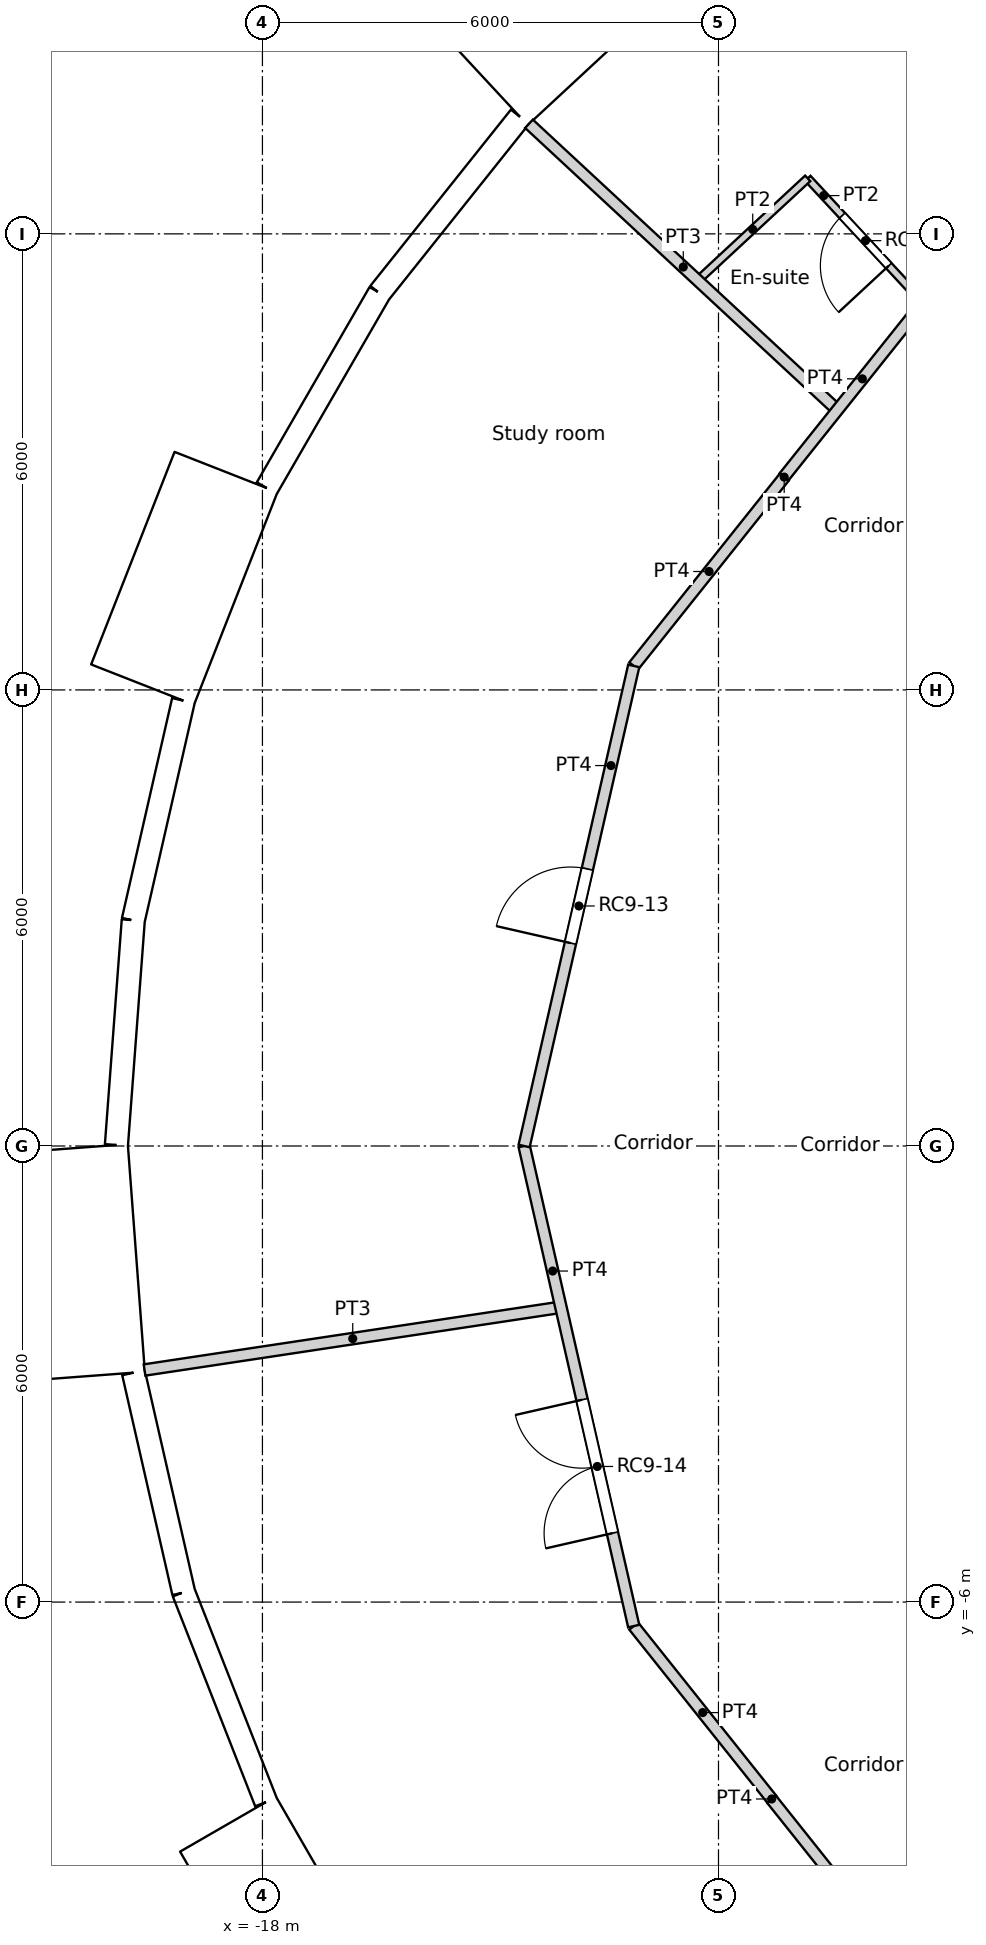
"""IFC4 building model, lengths in metres.
Left out: names, types, materials, properties, quantities, classifications, styles, units other than length and angle.
Written with IfcOpenShell. Run it as: python <this file> out.ifc"""

import sys

from ifc_helpers import new_model, si_unit, direction, frame, frame_2d, origin, origin_2d, place, context, subcontext, project, spatial, rectangle, circle, extrude, element, fill, save


model = new_model("IFC4")
c1 = context("Model", 3, precision=1e-05, world=origin(), true_north=direction((0.0, 1.0)))
c2 = subcontext(c1, "Body", "Model", "MODEL_VIEW")
j1 = project(units=[si_unit("LENGTHUNIT", "METRE"), si_unit("PLANEANGLEUNIT", "RADIAN")], contexts=[c1])
p1 = place(None, origin())
s1 = spatial("IfcSite", under=j1, at=p1, CompositionType="ELEMENT")
p2 = place(p1, origin())
s2 = spatial("IfcBuilding", under=s1, at=p2, CompositionType="ELEMENT")
p3 = place(p2, frame((0.0, 0.0, 316.2)))
s3 = spatial("IfcBuildingStorey", under=s2, at=p3, CompositionType="ELEMENT", Elevation=316.2)
for number, where, z_axis, x_axis in (
    (1, (-13.798, 12.802, 0.0), (0.0, 0.0, 1.0), (1.0, 0.0, 0.0)),
    (2, (-16.958, 8.167, 0.0), (0.0, 0.0, 1.0), (1.0, 0.0, 0.0)),
    (3, (-18.612, 2.805, 0.0), (0.0, 0.0, 1.0), (1.0, 0.0, 0.0)),
    (4, (-18.612, -2.805, 0.0), (0.0, 0.0, 1.0), (1.0, 0.0, 0.0)),
    (5, (-16.958, -8.167, 0.0), (0.0, 0.0, 1.0), (1.0, 0.0, 0.0)),
):
    element("IfcColumn", number, at=place(p3, frame(where, z_axis=z_axis, x_axis=x_axis)), inside=s3, PredefinedType="COLUMN", context=c2, shape_type="SweptSolid", body=[
        extrude(circle(Radius=0.45, at=origin_2d()), origin(), (0.0, 0.0, 1.0), 3.6),
    ])
p4 = place(p3, frame((-12.804, 16.005, -0.35), z_axis=(0.0, 0.0, 1.0), x_axis=(-0.733022439167, -0.680204457261, 0.0)))
e6 = element("IfcWall", 6, at=p4, inside=s3, PredefinedType="ELEMENTEDWALL", context=c2, shape_type="SweptSolid", body=[
    extrude(rectangle(XDim=3.0, YDim=1.45, at=frame_2d((1.5, 0.0))), origin(), (0.0, 0.0, 1.0), 3.6),
])
p5 = place(p4, frame((1.5, 0.0, 1.9)))
e7 = element("IfcOpeningElement", 7, at=p5, cuts=e6, PredefinedType="OPENING", context=c2, shape_type="SweptSolid", body=[
    extrude(circle(Radius=0.9, at=origin_2d()), frame((0.0, 0.735, 0.0), z_axis=(0.0, -1.0, 0.0), x_axis=(1.0, 0.0, 0.0)), (0.0, 0.0, 1.0), 1.47),
])
p6 = place(p3, frame((-14.613, 13.538, 0.0), z_axis=(0.0, 0.0, 1.0), x_axis=(-0.623498236992, -0.781824755599, 0.0)))
e8 = element("IfcWall", 8, at=p6, inside=s3, PredefinedType="SOLIDWALL", context=c2, shape_type="SweptSolid", body=[
    extrude(rectangle(XDim=2.962, YDim=0.3, at=frame_2d((1.481, 0.0))), origin(), (0.0, 0.0, 1.0), 3.25),
])
p7 = place(p6, frame((1.481, 0.0, 1.55)))
e9 = element("IfcOpeningElement", 9, at=p7, cuts=e8, PredefinedType="OPENING", context=c2, shape_type="SweptSolid", body=[
    extrude(circle(Radius=0.9, at=origin_2d()), frame((0.0, 0.16, 0.0), z_axis=(0.0, -1.0, 0.0), x_axis=(1.0, 0.0, 0.0)), (0.0, 0.0, 1.0), 0.32),
])
p8 = place(p3, frame((-16.46, 11.222, 0.0), z_axis=(0.0, 0.0, 1.0), x_axis=(-0.499950756475, -0.86605383268, 0.0)))
e10 = element("IfcWall", 10, at=p8, inside=s3, PredefinedType="SOLIDWALL", context=c2, shape_type="SweptSolid", body=[
    extrude(rectangle(XDim=2.962, YDim=0.3, at=frame_2d((1.481, 0.0))), origin(), (0.0, 0.0, 1.0), 3.25),
])
p9 = place(p8, frame((1.481, 0.0, 1.55)))
e11 = element("IfcOpeningElement", 11, at=p9, cuts=e10, PredefinedType="OPENING", context=c2, shape_type="SweptSolid", body=[
    extrude(circle(Radius=0.9, at=origin_2d()), frame((0.0, 0.16, 0.0), z_axis=(0.0, -1.0, 0.0), x_axis=(1.0, 0.0, 0.0)), (0.0, 0.0, 1.0), 0.32),
])
p10 = place(p3, frame((-18.48, 8.864, -0.35), z_axis=(0.0, 0.0, 1.0), x_axis=(-0.36537792632, -0.93085926485, 0.0)))
e12 = element("IfcWall", 12, at=p10, inside=s3, PredefinedType="ELEMENTEDWALL", context=c2, shape_type="SweptSolid", body=[
    extrude(rectangle(XDim=3.0, YDim=1.45, at=frame_2d((1.5, 0.0))), origin(), (0.0, 0.0, 1.0), 3.6),
])
p11 = place(p10, frame((1.5, 0.0, 1.9)))
e13 = element("IfcOpeningElement", 13, at=p11, cuts=e12, PredefinedType="OPENING", context=c2, shape_type="SweptSolid", body=[
    extrude(circle(Radius=0.9, at=origin_2d()), frame((0.0, 0.735, 0.0), z_axis=(0.0, -1.0, 0.0), x_axis=(1.0, 0.0, 0.0)), (0.0, 0.0, 1.0), 1.47),
])
p12 = place(p3, frame((-19.04, 5.857, 0.0), z_axis=(0.0, 0.0, 1.0), x_axis=(-0.222529389789, -0.974925982155, 0.0)))
e14 = element("IfcWall", 14, at=p12, inside=s3, PredefinedType="SOLIDWALL", context=c2, shape_type="SweptSolid", body=[
    extrude(rectangle(XDim=2.962, YDim=0.3, at=frame_2d((1.481, 0.0))), origin(), (0.0, 0.0, 1.0), 3.25),
])
p13 = place(p12, frame((1.481, 0.0, 1.55)))
e15 = element("IfcOpeningElement", 15, at=p13, cuts=e14, PredefinedType="OPENING", context=c2, shape_type="SweptSolid", body=[
    extrude(circle(Radius=0.9, at=origin_2d()), frame((0.0, 0.16, 0.0), z_axis=(0.0, -1.0, 0.0), x_axis=(1.0, 0.0, 0.0)), (0.0, 0.0, 1.0), 0.32),
])
p14 = place(p3, frame((-19.699, 2.969, 0.0), z_axis=(0.0, 0.0, 1.0), x_axis=(-0.07474897196, -0.997202382263, 0.0)))
e16 = element("IfcWall", 16, at=p14, inside=s3, PredefinedType="SOLIDWALL", context=c2, shape_type="SweptSolid", body=[
    extrude(rectangle(XDim=2.962, YDim=0.3, at=frame_2d((1.481, 0.0))), origin(), (0.0, 0.0, 1.0), 3.25),
])
p15 = place(p14, frame((1.481, 0.0, 1.55)))
e17 = element("IfcOpeningElement", 17, at=p15, cuts=e16, PredefinedType="OPENING", context=c2, shape_type="SweptSolid", body=[
    extrude(circle(Radius=0.9, at=origin_2d()), frame((0.0, 0.16, 0.0), z_axis=(0.0, -1.0, 0.0), x_axis=(1.0, 0.0, 0.0)), (0.0, 0.0, 1.0), 0.32),
])
p16 = place(p3, frame((-20.496, -0.032, -0.35), z_axis=(0.0, 0.0, 1.0), x_axis=(0.074785902127, -0.997199613339, 0.0)))
e18 = element("IfcWall", 18, at=p16, inside=s3, PredefinedType="ELEMENTEDWALL", context=c2, shape_type="SweptSolid", body=[
    extrude(rectangle(XDim=3.0, YDim=1.45, at=frame_2d((1.5, 0.0))), origin(), (0.0, 0.0, 1.0), 3.6),
])
p17 = place(p16, frame((1.5, 0.0, 1.9)))
e19 = element("IfcOpeningElement", 19, at=p17, cuts=e18, PredefinedType="OPENING", context=c2, shape_type="SweptSolid", body=[
    extrude(circle(Radius=0.9, at=origin_2d()), frame((0.0, 0.735, 0.0), z_axis=(0.0, -1.0, 0.0), x_axis=(1.0, 0.0, 0.0)), (0.0, 0.0, 1.0), 1.47),
])
p18 = place(p3, frame((-19.696, -2.984, 0.0), z_axis=(0.0, 0.0, 1.0), x_axis=(0.222529389789, -0.974925982155, 0.0)))
e20 = element("IfcWall", 20, at=p18, inside=s3, PredefinedType="SOLIDWALL", context=c2, shape_type="SweptSolid", body=[
    extrude(rectangle(XDim=2.962, YDim=0.3, at=frame_2d((1.481, 0.0))), origin(), (0.0, 0.0, 1.0), 3.25),
])
p19 = place(p18, frame((1.481, 0.0, 1.55)))
e21 = element("IfcOpeningElement", 21, at=p19, cuts=e20, PredefinedType="OPENING", context=c2, shape_type="SweptSolid", body=[
    extrude(circle(Radius=0.9, at=origin_2d()), frame((0.0, 0.16, 0.0), z_axis=(0.0, -1.0, 0.0), x_axis=(1.0, 0.0, 0.0)), (0.0, 0.0, 1.0), 0.32),
])
p20 = place(p3, frame((-19.037, -5.872, 0.0), z_axis=(0.0, 0.0, 1.0), x_axis=(0.36530043032, -0.930889679612, 0.0)))
e22 = element("IfcWall", 22, at=p20, inside=s3, PredefinedType="SOLIDWALL", context=c2, shape_type="SweptSolid", body=[
    extrude(rectangle(XDim=2.962, YDim=0.3, at=frame_2d((1.481, 0.0))), origin(), (0.0, 0.0, 1.0), 3.25),
])
p21 = place(p20, frame((1.481, 0.0, 1.55)))
e23 = element("IfcOpeningElement", 23, at=p21, cuts=e22, PredefinedType="OPENING", context=c2, shape_type="SweptSolid", body=[
    extrude(circle(Radius=0.9, at=origin_2d()), frame((0.0, 0.16, 0.0), z_axis=(0.0, -1.0, 0.0), x_axis=(1.0, 0.0, 0.0)), (0.0, 0.0, 1.0), 0.32),
])
p22 = place(p3, frame((-18.452, -8.921, -0.35), z_axis=(0.0, 0.0, 1.0), x_axis=(0.499990139034, -0.866031096941, 0.0)))
e24 = element("IfcWall", 24, at=p22, inside=s3, PredefinedType="ELEMENTEDWALL", context=c2, shape_type="SweptSolid", body=[
    extrude(rectangle(XDim=3.0, YDim=1.45, at=frame_2d((1.5, 0.0))), origin(), (0.0, 0.0, 1.0), 3.6),
])
p23 = place(p22, frame((1.5, 0.0, 1.9)))
e25 = element("IfcOpeningElement", 25, at=p23, cuts=e24, PredefinedType="OPENING", context=c2, shape_type="SweptSolid", body=[
    extrude(circle(Radius=0.9, at=origin_2d()), frame((0.0, 0.735, 0.0), z_axis=(0.0, -1.0, 0.0), x_axis=(1.0, 0.0, 0.0)), (0.0, 0.0, 1.0), 1.47),
])
p24 = place(p3, frame((-11.137, 8.803, 0.0), z_axis=(0.0, 0.0, 1.0), x_axis=(0.624018330412, 0.781409702595, 0.0)))
e26 = element("IfcWall", 26, at=p24, inside=s3, PredefinedType="PARTITIONING", context=c2, shape_type="SweptSolid", body=[
    extrude(rectangle(XDim=3.301, YDim=0.15, at=frame_2d((1.65, 0.0))), origin(), (0.0, 0.0, 1.0), 3.25),
])
p25 = place(p3, frame((-11.134, 8.8, 0.0), z_axis=(0.0, 0.0, 1.0), x_axis=(-1.0, 0.0, 0.0)))
e27 = element("IfcWall", 27, at=p25, inside=s3, PredefinedType="PARTITIONING", context=c2, shape_type="SweptSolid", body=[
    extrude(rectangle(XDim=0.003, YDim=0.15, at=frame_2d((0.001, 0.0))), origin(), (0.0, 0.0, 1.0), 3.25),
])
p26 = place(p3, frame((-11.3, -8.596, 0.0), z_axis=(0.0, 0.0, 1.0), x_axis=(0.623165080354, -0.782090328944, 0.0)))
e28 = element("IfcWall", 28, at=p26, inside=s3, PredefinedType="PARTITIONING", context=c2, shape_type="SweptSolid", body=[
    extrude(rectangle(XDim=3.564, YDim=0.15, at=frame_2d((1.782, 0.0))), origin(), (0.0, 0.0, 1.0), 3.25),
])
p27 = place(p3, frame((-11.3, -8.596, 0.0), z_axis=(0.0, 0.0, 1.0), x_axis=(0.0, 1.0, 0.0)))
e29 = element("IfcWall", 29, at=p27, inside=s3, PredefinedType="PARTITIONING", context=c2, shape_type="SweptSolid", body=[
    extrude(rectangle(XDim=0.011, YDim=0.15, at=frame_2d((0.006, 0.0))), origin(), (0.0, 0.0, 1.0), 3.25),
])
p28 = place(p3, frame((-14.557, 0.0, 0.0), z_axis=(0.0, 0.0, 1.0), x_axis=(0.222489165471, -0.974935162587, 0.0)))
e30 = element("IfcWall", 30, at=p28, inside=s3, PredefinedType="PARTITIONING", context=c2, shape_type="SweptSolid", body=[
    extrude(rectangle(XDim=6.479, YDim=0.15, at=frame_2d((3.239, 0.0))), origin(), (0.0, 0.0, 1.0), 3.25),
])
p29 = place(p28, frame((3.425, 0.0, 0.0)))
e31 = element("IfcOpeningElement", 31, at=p29, cuts=e30, PredefinedType="OPENING", context=c2, shape_type="SweptSolid", body=[
    extrude(rectangle(XDim=1.8, YDim=2.1, at=frame_2d((0.9, 1.05))), frame((0.0, 0.075, 0.0), z_axis=(0.0, -1.0, 0.0), x_axis=(1.0, 0.0, 0.0)), (0.0, 0.0, 1.0), 0.15),
])
p30 = place(p3, frame((-14.557, 0.0, 0.0), z_axis=(0.0, 0.0, 1.0), x_axis=(0.222568978642, 0.97491694505, 0.0)))
e32 = element("IfcWall", 32, at=p30, inside=s3, PredefinedType="PARTITIONING", context=c2, shape_type="SweptSolid", body=[
    extrude(rectangle(XDim=6.479, YDim=0.15, at=frame_2d((3.239, 0.0))), origin(), (0.0, 0.0, 1.0), 3.25),
])
p31 = place(p30, frame((2.739, 0.0, 0.0)))
e33 = element("IfcOpeningElement", 33, at=p31, cuts=e32, PredefinedType="OPENING", context=c2, shape_type="SweptSolid", body=[
    extrude(rectangle(XDim=1.0, YDim=2.04, at=frame_2d((0.5, 1.02))), frame((0.0, 0.075, 0.0), z_axis=(0.0, -1.0, 0.0), x_axis=(1.0, 0.0, 0.0)), (0.0, 0.0, 1.0), 0.15),
])
p32 = place(p3, frame((-13.115, 6.316, 0.0), z_axis=(0.0, 0.0, 1.0), x_axis=(0.623476099415, 0.781842409606, 0.0)))
e34 = element("IfcWall", 34, at=p32, inside=s3, PredefinedType="PARTITIONING", context=c2, shape_type="SweptSolid", body=[
    extrude(rectangle(XDim=3.177, YDim=0.15, at=frame_2d((1.589, 0.0))), origin(), (0.0, 0.0, 1.0), 3.25),
])
p33 = place(p3, frame((-13.115, -6.316, 0.0), z_axis=(0.0, 0.0, 1.0), x_axis=(0.623446514299, -0.781866001185, 0.0)))
e35 = element("IfcWall", 35, at=p33, inside=s3, PredefinedType="PARTITIONING", context=c2, shape_type="SweptSolid", body=[
    extrude(rectangle(XDim=2.911, YDim=0.15, at=frame_2d((1.456, 0.0))), origin(), (0.0, 0.0, 1.0), 3.25),
])
p34 = place(p3, frame((-9.886, 17.122, 0.0), z_axis=(0.0, 0.0, 1.0), x_axis=(0.500054359786, -0.865994016873, 0.0)))
e36 = element("IfcWall", 36, at=p34, inside=s3, PredefinedType="PARTITIONING", context=c2, shape_type="SweptSolid", body=[
    extrude(rectangle(XDim=5.54, YDim=0.15, at=frame_2d((2.77, 0.0))), origin(), (0.0, 0.0, 1.0), 3.25),
])
p35 = place(p3, frame((-10.826, 12.73, 0.0), z_axis=(0.0, 0.0, 1.0), x_axis=(0.680228963773, -0.732999697711, 0.0)))
e37 = element("IfcWall", 37, at=p35, inside=s3, PredefinedType="PARTITIONING", context=c2, shape_type="SweptSolid", body=[
    extrude(rectangle(XDim=2.235, YDim=0.1, at=frame_2d((1.117, 0.0))), origin(), (0.0, 0.0, 1.0), 3.25),
])
p36 = place(p35, frame((0.667, 0.0, 0.0)))
e38 = element("IfcOpeningElement", 38, at=p36, cuts=e37, PredefinedType="OPENING", context=c2, shape_type="SweptSolid", body=[
    extrude(rectangle(XDim=0.9, YDim=2.04, at=frame_2d((0.45, 1.02))), frame((0.0, 0.05, 0.0), z_axis=(0.0, -1.0, 0.0), x_axis=(1.0, 0.0, 0.0)), (0.0, 0.0, 1.0), 0.1),
])
p37 = place(p3, frame((-12.273, 11.387, 0.0), z_axis=(0.0, 0.0, 1.0), x_axis=(0.732956436026, 0.680275578636, 0.0)))
e39 = element("IfcWall", 39, at=p37, inside=s3, PredefinedType="PARTITIONING", context=c2, shape_type="SweptSolid", body=[
    extrude(rectangle(XDim=1.974, YDim=0.1, at=frame_2d((0.987, 0.0))), origin(), (0.0, 0.0, 1.0), 3.25),
])
p38 = place(p3, frame((-14.493, 13.448, 0.0), z_axis=(0.0, 0.0, 1.0), x_axis=(0.732845293448, -0.680395308531, 0.0)))
e40 = element("IfcWall", 40, at=p38, inside=s3, PredefinedType="PARTITIONING", context=c2, shape_type="SweptSolid", body=[
    extrude(rectangle(XDim=5.539, YDim=0.15, at=frame_2d((2.77, 0.0))), origin(), (0.0, 0.0, 1.0), 3.25),
])
p39 = place(p3, frame((-19.551, -2.947, 0.0), z_axis=(0.0, 0.0, 1.0), x_axis=(0.988824228734, 0.149086031099, 0.0)))
e41 = element("IfcWall", 41, at=p39, inside=s3, PredefinedType="PARTITIONING", context=c2, shape_type="SweptSolid", body=[
    extrude(rectangle(XDim=5.54, YDim=0.15, at=frame_2d((2.77, 0.0))), origin(), (0.0, 0.0, 1.0), 3.25),
])
p40 = place(p5, origin())
e42 = element("IfcWindow", 42, at=p40, inside=s3, PartitioningType="SINGLE_PANEL", PredefinedType="WINDOW", context=c2, shape_type="SweptSolid", body=[
    extrude(circle(Radius=0.9, at=origin_2d()), frame((0.0, 0.695, 0.0), z_axis=(0.0, -1.0, 0.0), x_axis=(1.0, 0.0, 0.0)), (0.0, 0.0, 1.0), 0.1),
])
fill(e7, e42)
p41 = place(p7, origin())
e43 = element("IfcWindow", 43, at=p41, inside=s3, PartitioningType="SINGLE_PANEL", PredefinedType="WINDOW", context=c2, shape_type="SweptSolid", body=[
    extrude(circle(Radius=0.9, at=origin_2d()), frame((0.0, 0.12, 0.0), z_axis=(0.0, -1.0, 0.0), x_axis=(1.0, 0.0, 0.0)), (0.0, 0.0, 1.0), 0.1),
])
fill(e9, e43)
p42 = place(p9, origin())
e44 = element("IfcWindow", 44, at=p42, inside=s3, PartitioningType="SINGLE_PANEL", PredefinedType="WINDOW", context=c2, shape_type="SweptSolid", body=[
    extrude(circle(Radius=0.9, at=origin_2d()), frame((0.0, 0.12, 0.0), z_axis=(0.0, -1.0, 0.0), x_axis=(1.0, 0.0, 0.0)), (0.0, 0.0, 1.0), 0.1),
])
fill(e11, e44)
p43 = place(p11, origin())
e45 = element("IfcWindow", 45, at=p43, inside=s3, PartitioningType="SINGLE_PANEL", PredefinedType="WINDOW", context=c2, shape_type="SweptSolid", body=[
    extrude(circle(Radius=0.9, at=origin_2d()), frame((0.0, 0.695, 0.0), z_axis=(0.0, -1.0, 0.0), x_axis=(1.0, 0.0, 0.0)), (0.0, 0.0, 1.0), 0.1),
])
fill(e13, e45)
p44 = place(p13, origin())
e46 = element("IfcWindow", 46, at=p44, inside=s3, PartitioningType="SINGLE_PANEL", PredefinedType="WINDOW", context=c2, shape_type="SweptSolid", body=[
    extrude(circle(Radius=0.9, at=origin_2d()), frame((0.0, 0.12, 0.0), z_axis=(0.0, -1.0, 0.0), x_axis=(1.0, 0.0, 0.0)), (0.0, 0.0, 1.0), 0.1),
])
fill(e15, e46)
p45 = place(p15, origin())
e47 = element("IfcWindow", 47, at=p45, inside=s3, PartitioningType="SINGLE_PANEL", PredefinedType="WINDOW", context=c2, shape_type="SweptSolid", body=[
    extrude(circle(Radius=0.9, at=origin_2d()), frame((0.0, 0.12, 0.0), z_axis=(0.0, -1.0, 0.0), x_axis=(1.0, 0.0, 0.0)), (0.0, 0.0, 1.0), 0.1),
])
fill(e17, e47)
p46 = place(p17, origin())
e48 = element("IfcWindow", 48, at=p46, inside=s3, PartitioningType="SINGLE_PANEL", PredefinedType="WINDOW", context=c2, shape_type="SweptSolid", body=[
    extrude(circle(Radius=0.9, at=origin_2d()), frame((0.0, 0.695, 0.0), z_axis=(0.0, -1.0, 0.0), x_axis=(1.0, 0.0, 0.0)), (0.0, 0.0, 1.0), 0.1),
])
fill(e19, e48)
p47 = place(p19, origin())
e49 = element("IfcWindow", 49, at=p47, inside=s3, PartitioningType="SINGLE_PANEL", PredefinedType="WINDOW", context=c2, shape_type="SweptSolid", body=[
    extrude(circle(Radius=0.9, at=origin_2d()), frame((0.0, 0.12, 0.0), z_axis=(0.0, -1.0, 0.0), x_axis=(1.0, 0.0, 0.0)), (0.0, 0.0, 1.0), 0.1),
])
fill(e21, e49)
p48 = place(p21, origin())
e50 = element("IfcWindow", 50, at=p48, inside=s3, PartitioningType="SINGLE_PANEL", PredefinedType="WINDOW", context=c2, shape_type="SweptSolid", body=[
    extrude(circle(Radius=0.9, at=origin_2d()), frame((0.0, 0.12, 0.0), z_axis=(0.0, -1.0, 0.0), x_axis=(1.0, 0.0, 0.0)), (0.0, 0.0, 1.0), 0.1),
])
fill(e23, e50)
p49 = place(p23, origin())
e51 = element("IfcWindow", 51, at=p49, inside=s3, PartitioningType="SINGLE_PANEL", PredefinedType="WINDOW", context=c2, shape_type="SweptSolid", body=[
    extrude(circle(Radius=0.9, at=origin_2d()), frame((0.0, 0.695, 0.0), z_axis=(0.0, -1.0, 0.0), x_axis=(1.0, 0.0, 0.0)), (0.0, 0.0, 1.0), 0.1),
])
fill(e25, e51)
p50 = place(p36, origin())
e52 = element("IfcDoor", 52, at=p50, inside=s3, OperationType="SINGLE_SWING_LEFT", PredefinedType="DOOR", context=c2, shape_type="SweptSolid", body=[
    extrude(rectangle(XDim=0.9, YDim=2.04, at=frame_2d((0.45, 1.02))), frame((0.0, 0.025, 0.0), z_axis=(0.0, -1.0, 0.0), x_axis=(1.0, 0.0, 0.0)), (0.0, 0.0, 1.0), 0.05),
])
fill(e38, e52)
p51 = place(p31, origin())
e53 = element("IfcDoor", 53, at=p51, inside=s3, OperationType="SINGLE_SWING_LEFT", PredefinedType="DOOR", context=c2, shape_type="SweptSolid", body=[
    extrude(rectangle(XDim=1.0, YDim=2.04, at=frame_2d((0.5, 1.02))), frame((0.0, 0.025, 0.0), z_axis=(0.0, -1.0, 0.0), x_axis=(1.0, 0.0, 0.0)), (0.0, 0.0, 1.0), 0.05),
])
fill(e33, e53)
p52 = place(p29, origin())
e54 = element("IfcDoor", 54, at=p52, inside=s3, OperationType="DOUBLE_DOOR_SINGLE_SWING", PredefinedType="DOOR", context=c2, shape_type="SweptSolid", body=[
    extrude(rectangle(XDim=1.8, YDim=2.1, at=frame_2d((0.9, 1.05))), frame((0.0, 0.025, 0.0), z_axis=(0.0, -1.0, 0.0), x_axis=(1.0, 0.0, 0.0)), (0.0, 0.0, 1.0), 0.05),
])
fill(e31, e54)
save(model, sys.argv[1])
